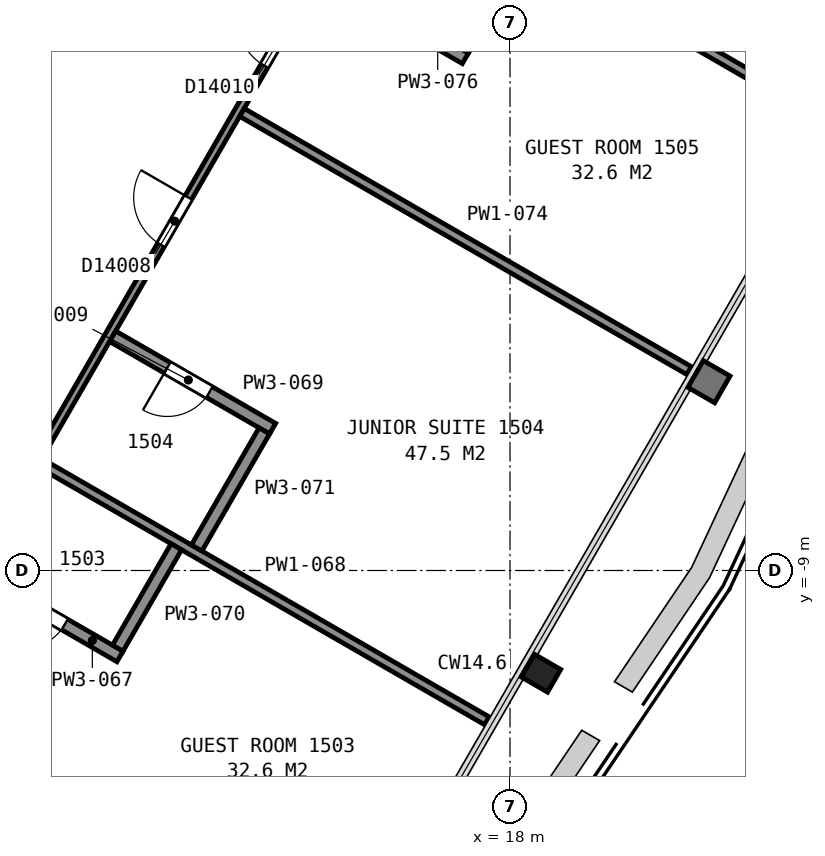
"""IFC4 building model, lengths in metres.
Left out: names, types, materials, properties, quantities, classifications, styles, units other than length and angle.
Written with IfcOpenShell. Run it as: python <this file> out.ifc"""

import sys

from ifc_helpers import new_model, si_unit, direction, frame, frame_2d, origin, origin_2d, place, context, subcontext, project, spatial, rectangle, i_section, extrude, element, fill, save


model = new_model("IFC4")
c1 = context("Model", 3, precision=1e-05, world=origin(), true_north=direction((0.0, 1.0)))
c2 = subcontext(c1, "Body", "Model", "MODEL_VIEW")
j1 = project(units=[si_unit("LENGTHUNIT", "METRE"), si_unit("PLANEANGLEUNIT", "RADIAN")], contexts=[c1])
p1 = place(None, origin())
s1 = spatial("IfcSite", under=j1, at=p1, CompositionType="ELEMENT")
p2 = place(p1, origin())
s2 = spatial("IfcBuilding", under=s1, at=p2, CompositionType="ELEMENT")
p3 = place(p2, frame((0.0, 0.0, 69.2)))
s3 = spatial("IfcBuildingStorey", under=s2, at=p3, CompositionType="ELEMENT", Elevation=69.2)
p4 = place(p3, frame((18.51, -10.69, 0.0), z_axis=(0.0, 0.0, 1.0), x_axis=(-0.5, -0.866025403784, 0.0)))
e1 = element("IfcColumn", 1, at=p4, inside=s3, PredefinedType="COLUMN", context=c2, shape_type="SweptSolid", body=[
    extrude(i_section(OverallWidth=0.432, OverallDepth=0.498, WebThickness=0.056, FlangeThickness=0.089, FilletRadius=0.015, at=origin_2d()), origin(), (0.0, 0.0, 1.0), 3.575),
])
p5 = place(p3, frame((8.492, -3.012, 0.0), z_axis=(0.0, 0.0, 1.0), x_axis=(0.499972957231, 0.866041016371, 0.0)))
e2 = element("IfcWall", 2, at=p5, inside=s3, PredefinedType="PARTITIONING", context=c2, shape_type="SweptSolid", body=[
    extrude(rectangle(XDim=10.349, YDim=0.2, at=frame_2d((5.174, 0.0))), origin(), (0.0, 0.0, 1.0), 3.35),
])
p6 = place(p3, frame((18.179, 6.606, 0.0), z_axis=(0.0, 0.0, 1.0), x_axis=(-0.500003973642, -0.866023109589, 0.0)))
e3 = element("IfcWall", 3, at=p6, inside=s3, PredefinedType="PARTITIONING", context=c2, shape_type="SweptSolid", body=[
    extrude(rectangle(XDim=28.826, YDim=0.125, at=frame_2d((14.413, 0.0))), origin(), (0.0, 0.0, 1.0), 2.613),
])
p7 = place(p6, frame((21.501, 0.0, 0.0)))
e4 = element("IfcOpeningElement", 4, at=p7, cuts=e3, PredefinedType="OPENING", context=c2, shape_type="SweptSolid", body=[
    extrude(rectangle(XDim=0.9, YDim=2.1, at=frame_2d((0.45, 1.05))), frame((0.0, 0.073, 0.0), z_axis=(0.0, -1.0, 0.0), x_axis=(1.0, 0.0, 0.0)), (0.0, 0.0, 1.0), 0.145),
])
p8 = place(p6, frame((18.894, 0.0, 0.0)))
e5 = element("IfcOpeningElement", 5, at=p8, cuts=e3, PredefinedType="OPENING", context=c2, shape_type="SweptSolid", body=[
    extrude(rectangle(XDim=0.9, YDim=2.1, at=frame_2d((0.45, 1.05))), frame((0.0, 0.073, 0.0), z_axis=(0.0, -1.0, 0.0), x_axis=(1.0, 0.0, 0.0)), (0.0, 0.0, 1.0), 0.145),
])
p9 = place(p6, frame((10.937, 0.0, 0.0)))
e6 = element("IfcOpeningElement", 6, at=p9, cuts=e3, PredefinedType="OPENING", context=c2, shape_type="SweptSolid", body=[
    extrude(rectangle(XDim=0.9, YDim=2.1, at=frame_2d((0.45, 1.05))), frame((0.0, 0.073, 0.0), z_axis=(0.0, -1.0, 0.0), x_axis=(1.0, 0.0, 0.0)), (0.0, 0.0, 1.0), 0.145),
])
p10 = place(p6, frame((7.535, 0.0, 0.0)))
e7 = element("IfcOpeningElement", 7, at=p10, cuts=e3, PredefinedType="OPENING", context=c2, shape_type="SweptSolid", body=[
    extrude(rectangle(XDim=0.9, YDim=2.1, at=frame_2d((0.45, 1.05))), frame((0.0, 0.073, 0.0), z_axis=(0.0, -1.0, 0.0), x_axis=(1.0, 0.0, 0.0)), (0.0, 0.0, 1.0), 0.145),
])
p11 = place(p6, frame((0.827, 0.0, 0.0)))
e8 = element("IfcOpeningElement", 8, at=p11, cuts=e3, PredefinedType="OPENING", context=c2, shape_type="SweptSolid", body=[
    extrude(rectangle(XDim=0.9, YDim=2.1, at=frame_2d((0.45, 1.05))), frame((0.0, 0.073, 0.0), z_axis=(0.0, -1.0, 0.0), x_axis=(1.0, 0.0, 0.0)), (0.0, 0.0, 1.0), 0.145),
])
p12 = place(p3, frame((7.911, -11.303, 0.0), z_axis=(0.0, 0.0, 1.0), x_axis=(0.866012267213, -0.500022752519, 0.0)))
e9 = element("IfcWall", 9, at=p12, inside=s3, PredefinedType="PARTITIONING", context=c2, shape_type="SweptSolid", body=[
    extrude(rectangle(XDim=8.492, YDim=0.15, at=frame_2d((4.246, 0.0))), origin(), (0.0, 0.0, 1.0), 2.613),
])
p13 = place(p3, frame((9.215, -9.045, 0.0), z_axis=(0.0, 0.0, 1.0), x_axis=(0.865989529477, -0.500062130976, 0.0)))
e10 = element("IfcWall", 10, at=p13, inside=s3, PredefinedType="PARTITIONING", context=c2, shape_type="SweptSolid", body=[
    extrude(rectangle(XDim=2.738, YDim=0.2, at=frame_2d((1.369, 0.0))), origin(), (0.0, 0.0, 1.0), 2.613),
])
p14 = place(p13, frame((0.887, 0.0, 0.0)))
e11 = element("IfcOpeningElement", 11, at=p14, cuts=e10, PredefinedType="OPENING", context=c2, shape_type="SweptSolid", body=[
    extrude(rectangle(XDim=0.8, YDim=2.1, at=frame_2d((0.4, 1.05))), frame((0.0, 0.11, 0.0), z_axis=(0.0, -1.0, 0.0), x_axis=(1.0, 0.0, 0.0)), (0.0, 0.0, 1.0), 0.22),
])
p15 = place(p3, frame((10.265, -7.226, 0.0), z_axis=(0.0, 0.0, 1.0), x_axis=(0.866024716685, -0.500001190089, 0.0)))
e12 = element("IfcWall", 12, at=p15, inside=s3, PredefinedType="PARTITIONING", context=c2, shape_type="SweptSolid", body=[
    extrude(rectangle(XDim=8.492, YDim=0.15, at=frame_2d((4.246, 0.0))), origin(), (0.0, 0.0, 1.0), 2.613),
])
p16 = place(p3, frame((14.096, -6.667, 0.0), z_axis=(0.0, 0.0, 1.0), x_axis=(-0.866023634079, 0.500003065207, 0.0)))
e13 = element("IfcWall", 13, at=p16, inside=s3, PredefinedType="PARTITIONING", context=c2, shape_type="SweptSolid", body=[
    extrude(rectangle(XDim=3.038, YDim=0.2, at=frame_2d((1.519, 0.0))), origin(), (0.0, 0.0, 1.0), 2.613),
])
p17 = place(p16, frame((1.2, 0.0, 0.0)))
e14 = element("IfcOpeningElement", 14, at=p17, cuts=e13, PredefinedType="OPENING", context=c2, shape_type="SweptSolid", body=[
    extrude(rectangle(XDim=0.8, YDim=2.1, at=frame_2d((0.4, 1.05))), frame((0.0, 0.11, 0.0), z_axis=(0.0, -1.0, 0.0), x_axis=(1.0, 0.0, 0.0)), (0.0, 0.0, 1.0), 0.22),
])
p18 = place(p3, frame((11.549, -10.277, 0.0), z_axis=(0.0, 0.0, 1.0), x_axis=(0.499876134923, 0.86609690551, 0.0)))
e15 = element("IfcWall", 15, at=p18, inside=s3, PredefinedType="PARTITIONING", context=c2, shape_type="SweptSolid", body=[
    extrude(rectangle(XDim=1.925, YDim=0.2, at=frame_2d((0.963, 0.0))), origin(), (0.0, 0.0, 1.0), 2.613),
])
p19 = place(p3, frame((12.846, -8.63, 0.0), z_axis=(0.0, 0.0, 1.0), x_axis=(0.500092923031, 0.865971748, 0.0)))
e16 = element("IfcWall", 16, at=p19, inside=s3, PredefinedType="PARTITIONING", context=c2, shape_type="SweptSolid", body=[
    extrude(rectangle(XDim=2.225, YDim=0.2, at=frame_2d((1.112, 0.0))), origin(), (0.0, 0.0, 1.0), 2.613),
])
p20 = place(p3, frame((13.591, -1.466, 0.0), z_axis=(0.0, 0.0, 1.0), x_axis=(0.866022790583, -0.50000452617, 0.0)))
e17 = element("IfcWall", 17, at=p20, inside=s3, PredefinedType="PARTITIONING", context=c2, shape_type="SweptSolid", body=[
    extrude(rectangle(XDim=8.491, YDim=0.15, at=frame_2d((4.246, 0.0))), origin(), (0.0, 0.0, 1.0), 2.613),
])
p21 = place(p3, frame((14.898, 0.789, 0.0), z_axis=(0.0, 0.0, 1.0), x_axis=(0.866102295869, -0.499866795347, 0.0)))
e18 = element("IfcWall", 18, at=p21, inside=s3, PredefinedType="PARTITIONING", context=c2, shape_type="SweptSolid", body=[
    extrude(rectangle(XDim=2.733, YDim=0.2, at=frame_2d((1.367, 0.0))), origin(), (0.0, 0.0, 1.0), 2.613),
])
p22 = place(p21, frame((0.883, 0.0, 0.0)))
e19 = element("IfcOpeningElement", 19, at=p22, cuts=e18, PredefinedType="OPENING", context=c2, shape_type="SweptSolid", body=[
    extrude(rectangle(XDim=0.8, YDim=2.1, at=frame_2d((0.4, 1.05))), frame((0.0, 0.11, 0.0), z_axis=(0.0, -1.0, 0.0), x_axis=(1.0, 0.0, 0.0)), (0.0, 0.0, 1.0), 0.22),
])
p23 = place(p3, frame((15.948, 2.608, 0.0), z_axis=(0.0, 0.0, 1.0), x_axis=(0.866059124033, -0.499941590267, 0.0)))
e20 = element("IfcWall", 20, at=p23, inside=s3, PredefinedType="PARTITIONING", context=c2, shape_type="SweptSolid", body=[
    extrude(rectangle(XDim=8.487, YDim=0.15, at=frame_2d((4.243, 0.0))), origin(), (0.0, 0.0, 1.0), 2.613),
])
p24 = place(p3, frame((17.229, -0.44, 0.0), z_axis=(0.0, 0.0, 1.0), x_axis=(0.499667418833, 0.866217334482, 0.0)))
e21 = element("IfcWall", 21, at=p24, inside=s3, PredefinedType="PARTITIONING", context=c2, shape_type="SweptSolid", body=[
    extrude(rectangle(XDim=1.92, YDim=0.2, at=frame_2d((0.96, 0.0))), origin(), (0.0, 0.0, 1.0), 2.613),
])
p25 = place(p9, origin())
e22 = element("IfcDoor", 22, at=p25, inside=s3, OperationType="SINGLE_SWING_LEFT", PredefinedType="DOOR", context=c2, shape_type="SweptSolid", body=[
    extrude(rectangle(XDim=0.9, YDim=2.1, at=frame_2d((0.45, 1.05))), frame((0.0, 0.025, 0.0), z_axis=(0.0, -1.0, 0.0), x_axis=(1.0, 0.0, 0.0)), (0.0, 0.0, 1.0), 0.05),
])
fill(e6, e22)
p26 = place(p10, origin())
e23 = element("IfcDoor", 23, at=p26, inside=s3, OperationType="SINGLE_SWING_LEFT", PredefinedType="DOOR", context=c2, shape_type="SweptSolid", body=[
    extrude(rectangle(XDim=0.9, YDim=2.1, at=frame_2d((0.45, 1.05))), frame((0.0, 0.025, 0.0), z_axis=(0.0, -1.0, 0.0), x_axis=(1.0, 0.0, 0.0)), (0.0, 0.0, 1.0), 0.05),
])
fill(e7, e23)
p27 = place(p14, origin())
e24 = element("IfcDoor", 24, at=p27, inside=s3, OperationType="SINGLE_SWING_LEFT", PredefinedType="DOOR", context=c2, shape_type="SweptSolid", body=[
    extrude(rectangle(XDim=0.8, YDim=2.1, at=frame_2d((0.4, 1.05))), frame((0.0, 0.025, 0.0), z_axis=(0.0, -1.0, 0.0), x_axis=(1.0, 0.0, 0.0)), (0.0, 0.0, 1.0), 0.05),
])
fill(e11, e24)
p28 = place(p17, origin())
e25 = element("IfcDoor", 25, at=p28, inside=s3, OperationType="SINGLE_SWING_RIGHT", PredefinedType="DOOR", context=c2, shape_type="SweptSolid", body=[
    extrude(rectangle(XDim=0.8, YDim=2.1, at=frame_2d((0.4, 1.05))), frame((0.0, 0.025, 0.0), z_axis=(0.0, -1.0, 0.0), x_axis=(1.0, 0.0, 0.0)), (0.0, 0.0, 1.0), 0.05),
])
fill(e14, e25)
save(model, sys.argv[1])
